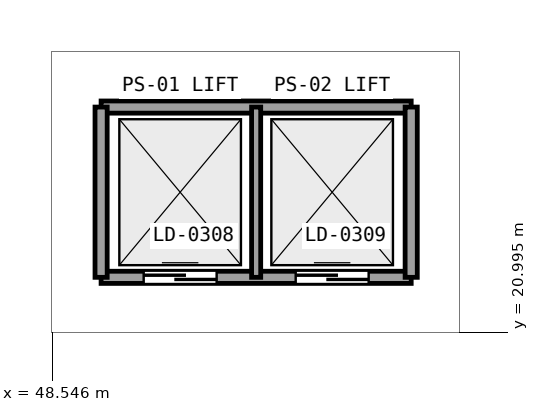
"""IFC4 building model, lengths in metres.
Left out: names, types, materials, properties, quantities, classifications, styles, units other than length and angle.
Written with IfcOpenShell. Run it as: python <this file> out.ifc"""

import sys

from ifc_helpers import new_model, si_unit, direction, frame, frame_2d, origin, place, context, subcontext, project, spatial, rectangle, extrude, element, fill, save


model = new_model("IFC4")
c1 = context("Model", 3, precision=1e-05, world=origin(), true_north=direction((0.0, 1.0)))
c2 = subcontext(c1, "Body", "Model", "MODEL_VIEW")
j1 = project(units=[si_unit("LENGTHUNIT", "METRE"), si_unit("PLANEANGLEUNIT", "RADIAN")], contexts=[c1])
p1 = place(None, origin())
s1 = spatial("IfcSite", under=j1, at=p1, CompositionType="ELEMENT")
p2 = place(p1, origin())
s2 = spatial("IfcBuilding", under=s1, at=p2, CompositionType="ELEMENT")
p3 = place(p2, frame((0.0, 0.0, 16.2)))
s3 = spatial("IfcBuildingStorey", under=s2, at=p3, CompositionType="ELEMENT", Elevation=16.2)
p4 = place(p3, frame((49.35, 24.7, 0.0), z_axis=(0.0, 0.0, 1.0), x_axis=(1.0, 0.0, 0.0)))
e1 = element("IfcWall", 1, at=p4, inside=s3, PredefinedType="SOLIDWALL", context=c2, shape_type="SweptSolid", body=[
    extrude(rectangle(XDim=5.1, YDim=0.2, at=frame_2d((2.55, 0.0))), origin(), (0.0, 0.0, 1.0), 4.98),
])
p5 = place(p3, frame((49.35, 21.9, 0.0), z_axis=(0.0, 0.0, 1.0), x_axis=(1.0, 0.0, 0.0)))
e2 = element("IfcWall", 2, at=p5, inside=s3, PredefinedType="SOLIDWALL", context=c2, shape_type="SweptSolid", body=[
    extrude(rectangle(XDim=5.1, YDim=0.2, at=frame_2d((2.55, 0.0))), origin(), (0.0, 0.0, 1.0), 4.98),
])
p6 = place(p5, frame((0.7, 0.0, 0.0)))
e3 = element("IfcOpeningElement", 3, at=p6, cuts=e2, PredefinedType="OPENING", context=c2, shape_type="SweptSolid", body=[
    extrude(rectangle(XDim=1.2, YDim=2.15, at=frame_2d((0.6, 1.075))), frame((0.0, 0.11, 0.0), z_axis=(0.0, -1.0, 0.0), x_axis=(1.0, 0.0, 0.0)), (0.0, 0.0, 1.0), 0.22),
])
p7 = place(p5, frame((3.2, 0.0, 0.0)))
e4 = element("IfcOpeningElement", 4, at=p7, cuts=e2, PredefinedType="OPENING", context=c2, shape_type="SweptSolid", body=[
    extrude(rectangle(XDim=1.2, YDim=2.15, at=frame_2d((0.6, 1.075))), frame((0.0, 0.11, 0.0), z_axis=(0.0, -1.0, 0.0), x_axis=(1.0, 0.0, 0.0)), (0.0, 0.0, 1.0), 0.22),
])
for number, where, z_axis, x_axis in (
    (5, (49.35, 21.9, 0.0), (0.0, 0.0, 1.0), (0.0, 1.0, 0.0)),
    (6, (54.45, 21.9, 0.0), (0.0, 0.0, 1.0), (0.0, 1.0, 0.0)),
):
    element("IfcWall", number, at=place(p3, frame(where, z_axis=z_axis, x_axis=x_axis)), inside=s3, PredefinedType="SOLIDWALL", context=c2, shape_type="SweptSolid", body=[
        extrude(rectangle(XDim=2.8, YDim=0.2, at=frame_2d((1.4, 0.0))), origin(), (0.0, 0.0, 1.0), 4.98),
    ])
p8 = place(p3, frame((51.9, 21.9, 0.0), z_axis=(0.0, 0.0, 1.0), x_axis=(0.0, 1.0, 0.0)))
e7 = element("IfcWall", 7, at=p8, inside=s3, PredefinedType="PARTITIONING", context=c2, shape_type="SweptSolid", body=[
    extrude(rectangle(XDim=2.8, YDim=0.15, at=frame_2d((1.4, 0.0))), origin(), (0.0, 0.0, 1.0), 4.98),
])
p9 = place(p6, origin())
e8 = element("IfcDoor", 8, at=p9, inside=s3, OperationType="SLIDING_TO_LEFT", PredefinedType="DOOR", context=c2, shape_type="SweptSolid", body=[
    extrude(rectangle(XDim=1.2, YDim=2.15, at=frame_2d((0.6, 1.075))), frame((0.0, 0.025, 0.0), z_axis=(0.0, -1.0, 0.0), x_axis=(1.0, 0.0, 0.0)), (0.0, 0.0, 1.0), 0.05),
])
fill(e3, e8)
p10 = place(p7, origin())
e9 = element("IfcDoor", 9, at=p10, inside=s3, OperationType="SLIDING_TO_LEFT", PredefinedType="DOOR", context=c2, shape_type="SweptSolid", body=[
    extrude(rectangle(XDim=1.2, YDim=2.15, at=frame_2d((0.6, 1.075))), frame((0.0, 0.025, 0.0), z_axis=(0.0, -1.0, 0.0), x_axis=(1.0, 0.0, 0.0)), (0.0, 0.0, 1.0), 0.05),
])
fill(e4, e9)
save(model, sys.argv[1])
